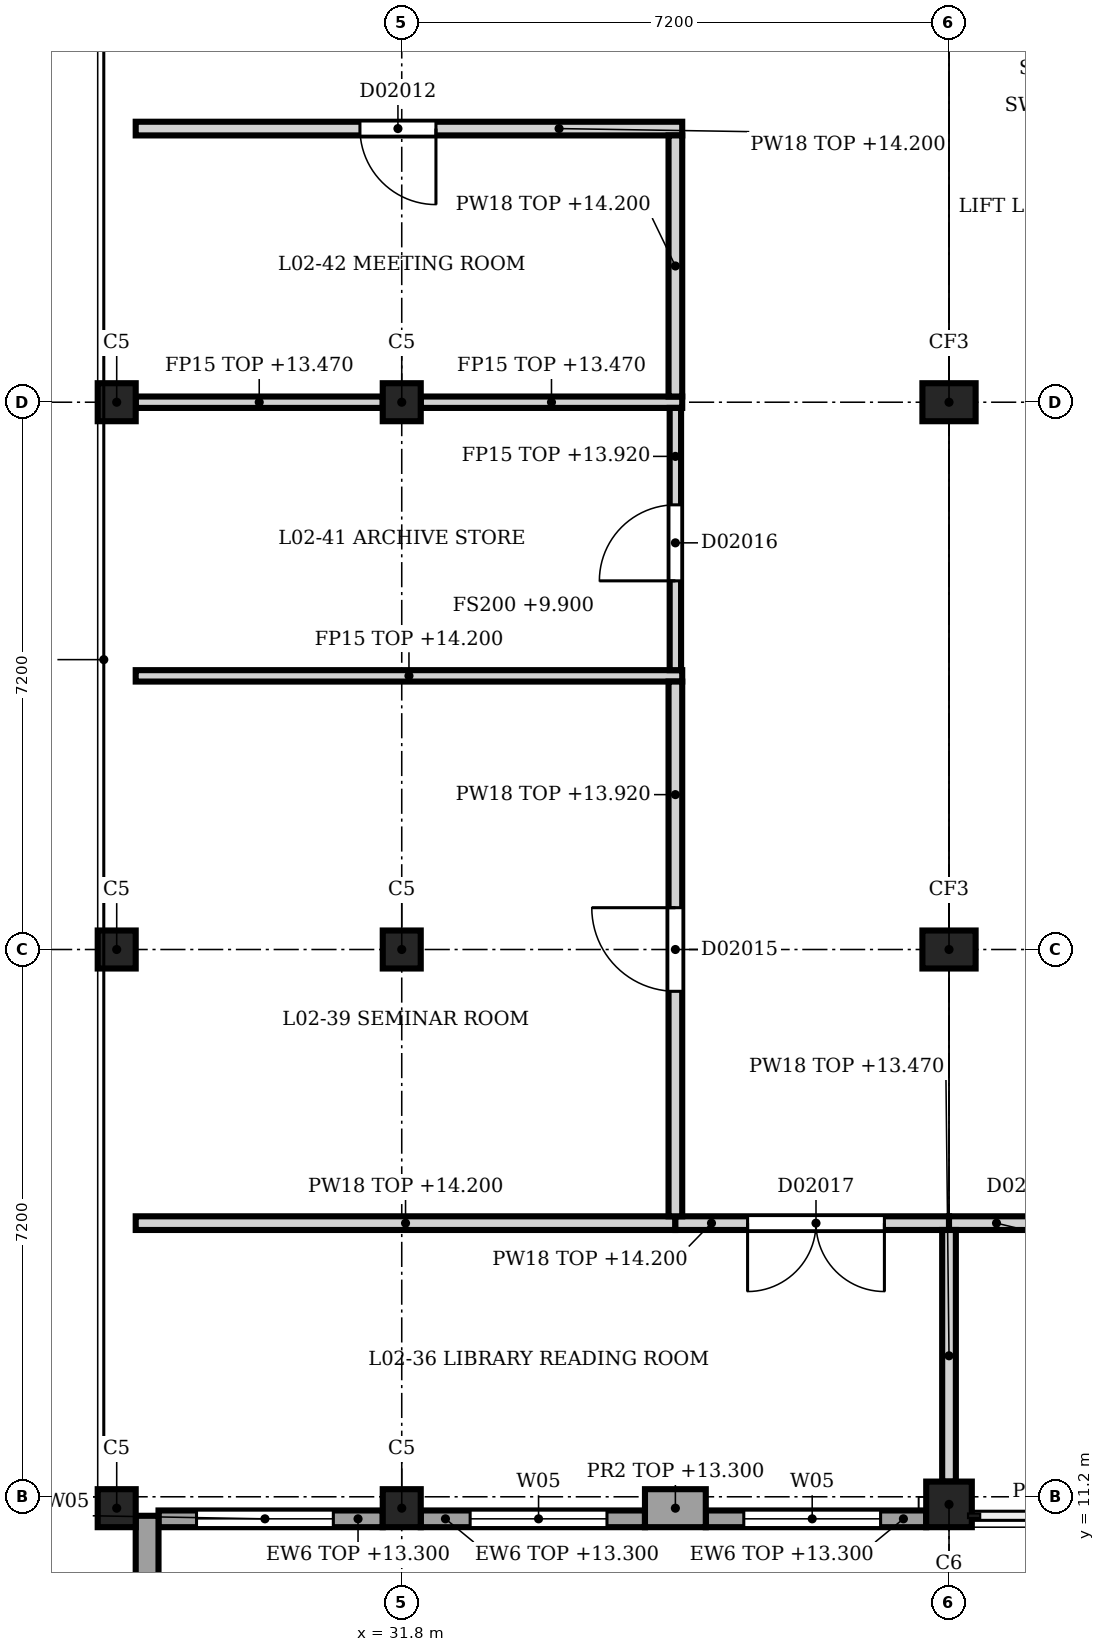
"""IFC4 building model, lengths in metres.
Left out: names, types, materials, properties, quantities, classifications, styles, units other than length and angle.
Written with IfcOpenShell. Run it as: python <this file> out.ifc"""

import sys

from ifc_helpers import new_model, si_unit, direction, frame, frame_2d, origin, origin_2d, place, context, subcontext, project, spatial, rectangle, extrude, element, fill, save


model = new_model("IFC4")
c1 = context("Model", 3, precision=1e-05, world=origin(), true_north=direction((0.0, 1.0)))
c2 = subcontext(c1, "Body", "Model", "MODEL_VIEW")
j1 = project(units=[si_unit("LENGTHUNIT", "METRE"), si_unit("PLANEANGLEUNIT", "RADIAN")], contexts=[c1])
p1 = place(None, origin())
s1 = spatial("IfcSite", under=j1, at=p1, CompositionType="ELEMENT")
p2 = place(p1, origin())
s2 = spatial("IfcBuilding", under=s1, at=p2, CompositionType="ELEMENT")
p3 = place(p2, frame((0.0, 0.0, 9.9)))
s3 = spatial("IfcBuildingStorey", under=s2, at=p3, CompositionType="ELEMENT", Elevation=9.9)
p4 = place(p3, frame((39.0, 11.1, 0.0), z_axis=(0.0, 0.0, 1.0), x_axis=(1.0, 0.0, 0.0)))
e1 = element("IfcColumn", 1, at=p4, inside=s3, PredefinedType="COLUMN", context=c2, shape_type="SweptSolid", body=[
    extrude(rectangle(XDim=0.6, YDim=0.6, at=origin_2d()), origin(), (0.0, 0.0, 1.0), 4.5),
])
for number, where, z_axis, x_axis in (
    (2, (39.0, 18.4, 0.0), (0.0, 0.0, 1.0), (1.0, 0.0, 0.0)),
    (3, (39.0, 25.6, 0.0), (0.0, 0.0, 1.0), (1.0, 0.0, 0.0)),
):
    element("IfcColumn", number, at=place(p3, frame(where, z_axis=z_axis, x_axis=x_axis)), inside=s3, PredefinedType="COLUMN", context=c2, shape_type="SweptSolid", body=[
        extrude(rectangle(XDim=0.7, YDim=0.5, at=origin_2d()), origin(), (0.0, 0.0, 1.0), 4.5),
    ])
for number, where, z_axis, x_axis in (
    (4, (28.05, 11.05, 0.0), (0.0, 0.0, 1.0), (1.0, 0.0, 0.0)),
    (5, (28.05, 18.4, 0.0), (0.0, 0.0, 1.0), (1.0, 0.0, 0.0)),
    (6, (28.05, 25.6, 0.0), (0.0, 0.0, 1.0), (1.0, 0.0, 0.0)),
    (7, (31.8, 11.05, 0.0), (0.0, 0.0, 1.0), (1.0, 0.0, 0.0)),
    (8, (31.8, 18.4, 0.0), (0.0, 0.0, 1.0), (1.0, 0.0, 0.0)),
    (9, (31.8, 25.6, 0.0), (0.0, 0.0, 1.0), (1.0, 0.0, 0.0)),
):
    element("IfcColumn", number, at=place(p3, frame(where, z_axis=z_axis, x_axis=x_axis)), inside=s3, PredefinedType="COLUMN", context=c2, shape_type="SweptSolid", body=[
        extrude(rectangle(XDim=0.5, YDim=0.5, at=origin_2d()), origin(), (0.0, 0.0, 1.0), 4.5),
    ])
p5 = place(p3, frame((28.45, 10.95, 0.0), z_axis=(0.0, 0.0, 1.0), x_axis=(0.0, -1.0, 0.0)))
e10 = element("IfcWall", 10, at=p5, inside=s3, PredefinedType="SOLIDWALL", context=c2, shape_type="SweptSolid", body=[
    extrude(rectangle(XDim=6.95, YDim=0.3, at=frame_2d((3.475, 0.0))), origin(), (0.0, 0.0, 1.0), 4.5),
])
p6 = place(p3, frame((35.8, 11.05, 0.0), z_axis=(0.0, 0.0, 1.0), x_axis=(-1.0, 0.0, 0.0)))
e11 = element("IfcWall", 11, at=p6, inside=s3, PredefinedType="SOLIDWALL", context=c2, shape_type="SweptSolid", body=[
    extrude(rectangle(XDim=0.8, YDim=0.5, at=frame_2d((0.4, 0.0))), origin(), (0.0, 0.0, 1.0), 3.4),
])
p7 = place(p3, frame((38.7, 10.91, 0.0), z_axis=(0.0, 0.0, 1.0), x_axis=(-1.0, 0.0, 0.0)))
e12 = element("IfcWall", 12, at=p7, inside=s3, PredefinedType="SOLIDWALL", context=c2, shape_type="SweptSolid", body=[
    extrude(rectangle(XDim=2.9, YDim=0.22, at=frame_2d((1.45, 0.0))), origin(), (0.0, 0.0, 1.0), 3.4),
])
p8 = place(p7, frame((0.6, 0.0, 0.9)))
e13 = element("IfcOpeningElement", 13, at=p8, cuts=e12, PredefinedType="OPENING", context=c2, shape_type="SweptSolid", body=[
    extrude(rectangle(XDim=1.8, YDim=2.4, at=frame_2d((0.9, 1.2))), frame((0.0, 0.12, 0.0), z_axis=(0.0, -1.0, 0.0), x_axis=(1.0, 0.0, 0.0)), (0.0, 0.0, 1.0), 0.24),
])
p9 = place(p3, frame((35.0, 10.91, 0.0), z_axis=(0.0, 0.0, 1.0), x_axis=(-1.0, 0.0, 0.0)))
e14 = element("IfcWall", 14, at=p9, inside=s3, PredefinedType="SOLIDWALL", context=c2, shape_type="SweptSolid", body=[
    extrude(rectangle(XDim=2.95, YDim=0.22, at=frame_2d((1.475, 0.0))), origin(), (0.0, 0.0, 1.0), 3.4),
])
p10 = place(p9, frame((0.5, 0.0, 0.9)))
e15 = element("IfcOpeningElement", 15, at=p10, cuts=e14, PredefinedType="OPENING", context=c2, shape_type="SweptSolid", body=[
    extrude(rectangle(XDim=1.8, YDim=2.4, at=frame_2d((0.9, 1.2))), frame((0.0, 0.12, 0.0), z_axis=(0.0, -1.0, 0.0), x_axis=(1.0, 0.0, 0.0)), (0.0, 0.0, 1.0), 0.24),
])
p11 = place(p3, frame((31.55, 10.91, 0.0), z_axis=(0.0, 0.0, 1.0), x_axis=(-1.0, 0.0, 0.0)))
e16 = element("IfcWall", 16, at=p11, inside=s3, PredefinedType="SOLIDWALL", context=c2, shape_type="SweptSolid", body=[
    extrude(rectangle(XDim=2.95, YDim=0.22, at=frame_2d((1.475, 0.0))), origin(), (0.0, 0.0, 1.0), 3.4),
])
p12 = place(p11, frame((0.65, 0.0, 0.9)))
e17 = element("IfcOpeningElement", 17, at=p12, cuts=e16, PredefinedType="OPENING", context=c2, shape_type="SweptSolid", body=[
    extrude(rectangle(XDim=1.8, YDim=2.4, at=frame_2d((0.9, 1.2))), frame((0.0, 0.12, 0.0), z_axis=(0.0, -1.0, 0.0), x_axis=(1.0, 0.0, 0.0)), (0.0, 0.0, 1.0), 0.24),
])
p13 = place(p2, frame((0.0, 0.0, 5.4)))
s4 = spatial("IfcBuildingStorey", under=s2, at=p13, CompositionType="ELEMENT", Elevation=5.4)
p14 = place(p13, frame((28.2, 14.8, 0.0), z_axis=(0.0, 0.0, 1.0), x_axis=(-1.0, 0.0, 0.0)))
e18 = element("IfcWall", 18, at=p14, inside=s4, PredefinedType="PARTITIONING", context=c2, shape_type="SweptSolid", body=[
    extrude(rectangle(XDim=7.2, YDim=0.18, at=frame_2d((3.6, 0.0))), origin(), (0.0, 0.0, 1.0), 10.2),
])
p15 = place(p14, frame((2.65, 0.0, 0.0)))
e19 = element("IfcOpeningElement", 19, at=p15, cuts=e18, PredefinedType="OPENING", context=c2, shape_type="SweptSolid", body=[
    extrude(rectangle(XDim=2.0, YDim=2.3, at=frame_2d((1.0, 1.15))), frame((0.0, 0.1, 0.0), z_axis=(0.0, -1.0, 0.0), x_axis=(1.0, 0.0, 0.0)), (0.0, 0.0, 1.0), 0.2),
])
p16 = place(p3, frame((28.3, 14.8, 0.0), z_axis=(0.0, 0.0, 1.0), x_axis=(1.0, 0.0, 0.0)))
e20 = element("IfcWall", 20, at=p16, inside=s3, PredefinedType="PARTITIONING", context=c2, shape_type="SweptSolid", body=[
    extrude(rectangle(XDim=7.1, YDim=0.18, at=frame_2d((3.55, 0.0))), origin(), (0.0, 0.0, 1.0), 4.3),
])
p17 = place(p3, frame((35.4, 14.8, 0.0), z_axis=(0.0, 0.0, 1.0), x_axis=(1.0, 0.0, 0.0)))
e21 = element("IfcWall", 21, at=p17, inside=s3, PredefinedType="PARTITIONING", context=c2, shape_type="SweptSolid", body=[
    extrude(rectangle(XDim=3.6, YDim=0.18, at=frame_2d((1.8, 0.0))), origin(), (0.0, 0.0, 1.0), 4.3),
])
p18 = place(p17, frame((0.95, 0.0, 0.0)))
e22 = element("IfcOpeningElement", 22, at=p18, cuts=e21, PredefinedType="OPENING", context=c2, shape_type="SweptSolid", body=[
    extrude(rectangle(XDim=1.8, YDim=2.1, at=frame_2d((0.9, 1.05))), frame((0.0, 0.1, 0.0), z_axis=(0.0, -1.0, 0.0), x_axis=(1.0, 0.0, 0.0)), (0.0, 0.0, 1.0), 0.2),
])
p19 = place(p3, frame((42.0, 14.8, 0.0), z_axis=(0.0, 0.0, 1.0), x_axis=(-1.0, 0.0, 0.0)))
e23 = element("IfcWall", 23, at=p19, inside=s3, PredefinedType="PARTITIONING", context=c2, shape_type="SweptSolid", body=[
    extrude(rectangle(XDim=3.0, YDim=0.18, at=frame_2d((1.5, 0.0))), origin(), (0.0, 0.0, 1.0), 4.3),
])
p20 = place(p19, frame((0.65, 0.0, 0.0)))
e24 = element("IfcOpeningElement", 24, at=p20, cuts=e23, PredefinedType="OPENING", context=c2, shape_type="SweptSolid", body=[
    extrude(rectangle(XDim=1.1, YDim=2.3, at=frame_2d((0.55, 1.15))), frame((0.0, 0.1, 0.0), z_axis=(0.0, -1.0, 0.0), x_axis=(1.0, 0.0, 0.0)), (0.0, 0.0, 1.0), 0.2),
])
p21 = place(p3, frame((28.3, 22.0, 0.0), z_axis=(0.0, 0.0, 1.0), x_axis=(1.0, 0.0, 0.0)))
e25 = element("IfcWall", 25, at=p21, inside=s3, PredefinedType="PARTITIONING", context=c2, shape_type="SweptSolid", body=[
    extrude(rectangle(XDim=7.19, YDim=0.15, at=frame_2d((3.595, 0.0))), origin(), (0.0, 0.0, 1.0), 4.3),
])
p22 = place(p3, frame((28.3, 25.6, 0.0), z_axis=(0.0, 0.0, 1.0), x_axis=(1.0, 0.0, 0.0)))
e26 = element("IfcWall", 26, at=p22, inside=s3, PredefinedType="PARTITIONING", context=c2, shape_type="SweptSolid", body=[
    extrude(rectangle(XDim=3.25, YDim=0.15, at=frame_2d((1.625, 0.0))), origin(), (0.0, 0.0, 1.0), 3.57),
])
p23 = place(p3, frame((32.05, 25.6, 0.0), z_axis=(0.0, 0.0, 1.0), x_axis=(1.0, 0.0, 0.0)))
e27 = element("IfcWall", 27, at=p23, inside=s3, PredefinedType="PARTITIONING", context=c2, shape_type="SweptSolid", body=[
    extrude(rectangle(XDim=3.44, YDim=0.15, at=frame_2d((1.72, 0.0))), origin(), (0.0, 0.0, 1.0), 3.57),
])
p24 = place(p3, frame((35.49, 29.2, 0.0), z_axis=(0.0, 0.0, 1.0), x_axis=(-1.0, 0.0, 0.0)))
e28 = element("IfcWall", 28, at=p24, inside=s3, PredefinedType="PARTITIONING", context=c2, shape_type="SweptSolid", body=[
    extrude(rectangle(XDim=7.19, YDim=0.18, at=frame_2d((3.595, 0.0))), origin(), (0.0, 0.0, 1.0), 4.3),
])
p25 = place(p24, frame((3.24, 0.0, 0.0)))
e29 = element("IfcOpeningElement", 29, at=p25, cuts=e28, PredefinedType="OPENING", context=c2, shape_type="SweptSolid", body=[
    extrude(rectangle(XDim=1.0, YDim=2.1, at=frame_2d((0.5, 1.05))), frame((0.0, 0.1, 0.0), z_axis=(0.0, -1.0, 0.0), x_axis=(1.0, 0.0, 0.0)), (0.0, 0.0, 1.0), 0.2),
])
p26 = place(p3, frame((35.4, 14.89, 0.0), z_axis=(0.0, 0.0, 1.0), x_axis=(0.0, 1.0, 0.0)))
e30 = element("IfcWall", 30, at=p26, inside=s3, PredefinedType="PARTITIONING", context=c2, shape_type="SweptSolid", body=[
    extrude(rectangle(XDim=7.035, YDim=0.18, at=frame_2d((3.518, 0.0))), origin(), (0.0, 0.0, 1.0), 4.02),
])
p27 = place(p26, frame((2.96, 0.0, 0.0)))
e31 = element("IfcOpeningElement", 31, at=p27, cuts=e30, PredefinedType="OPENING", context=c2, shape_type="SweptSolid", body=[
    extrude(rectangle(XDim=1.1, YDim=2.3, at=frame_2d((0.55, 1.15))), frame((0.0, 0.1, 0.0), z_axis=(0.0, -1.0, 0.0), x_axis=(1.0, 0.0, 0.0)), (0.0, 0.0, 1.0), 0.2),
])
p28 = place(p3, frame((35.4, 22.075, 0.0), z_axis=(0.0, 0.0, 1.0), x_axis=(0.0, 1.0, 0.0)))
e32 = element("IfcWall", 32, at=p28, inside=s3, PredefinedType="PARTITIONING", context=c2, shape_type="SweptSolid", body=[
    extrude(rectangle(XDim=3.45, YDim=0.15, at=frame_2d((1.725, 0.0))), origin(), (0.0, 0.0, 1.0), 4.02),
])
p29 = place(p28, frame((1.175, 0.0, 0.0)))
e33 = element("IfcOpeningElement", 33, at=p29, cuts=e32, PredefinedType="OPENING", context=c2, shape_type="SweptSolid", body=[
    extrude(rectangle(XDim=1.0, YDim=2.1, at=frame_2d((0.5, 1.05))), frame((0.0, 0.085, 0.0), z_axis=(0.0, -1.0, 0.0), x_axis=(1.0, 0.0, 0.0)), (0.0, 0.0, 1.0), 0.17),
])
p30 = place(p3, frame((35.4, 25.675, 0.0), z_axis=(0.0, 0.0, 1.0), x_axis=(0.0, 1.0, 0.0)))
e34 = element("IfcWall", 34, at=p30, inside=s3, PredefinedType="PARTITIONING", context=c2, shape_type="SweptSolid", body=[
    extrude(rectangle(XDim=3.435, YDim=0.18, at=frame_2d((1.718, 0.0))), origin(), (0.0, 0.0, 1.0), 4.3),
])
p31 = place(p3, frame((39.0, 11.4, 0.0), z_axis=(0.0, 0.0, 1.0), x_axis=(0.0, 1.0, 0.0)))
e35 = element("IfcWall", 35, at=p31, inside=s3, PredefinedType="PARTITIONING", context=c2, shape_type="SweptSolid", body=[
    extrude(rectangle(XDim=3.31, YDim=0.18, at=frame_2d((1.655, 0.0))), origin(), (0.0, 0.0, 1.0), 3.57),
])
p32 = place(p8, origin())
e36 = element("IfcWindow", 36, at=p32, inside=s3, PartitioningType="SINGLE_PANEL", PredefinedType="WINDOW", context=c2, shape_type="SweptSolid", body=[
    extrude(rectangle(XDim=1.8, YDim=2.4, at=frame_2d((0.9, 1.2))), frame((0.0, 0.03, 0.0), z_axis=(0.0, -1.0, 0.0), x_axis=(1.0, 0.0, 0.0)), (0.0, 0.0, 1.0), 0.06),
])
fill(e13, e36)
p33 = place(p10, origin())
e37 = element("IfcWindow", 37, at=p33, inside=s3, PartitioningType="SINGLE_PANEL", PredefinedType="WINDOW", context=c2, shape_type="SweptSolid", body=[
    extrude(rectangle(XDim=1.8, YDim=2.4, at=frame_2d((0.9, 1.2))), frame((0.0, 0.03, 0.0), z_axis=(0.0, -1.0, 0.0), x_axis=(1.0, 0.0, 0.0)), (0.0, 0.0, 1.0), 0.06),
])
fill(e15, e37)
p34 = place(p12, origin())
e38 = element("IfcWindow", 38, at=p34, inside=s3, PartitioningType="SINGLE_PANEL", PredefinedType="WINDOW", context=c2, shape_type="SweptSolid", body=[
    extrude(rectangle(XDim=1.8, YDim=2.4, at=frame_2d((0.9, 1.2))), frame((0.0, 0.03, 0.0), z_axis=(0.0, -1.0, 0.0), x_axis=(1.0, 0.0, 0.0)), (0.0, 0.0, 1.0), 0.06),
])
fill(e17, e38)
p35 = place(p18, origin())
e39 = element("IfcDoor", 39, at=p35, inside=s3, OperationType="SINGLE_SWING_LEFT", PredefinedType="DOOR", context=c2, shape_type="SweptSolid", body=[
    extrude(rectangle(XDim=1.8, YDim=2.1, at=frame_2d((0.9, 1.05))), frame((0.0, 0.025, 0.0), z_axis=(0.0, -1.0, 0.0), x_axis=(1.0, 0.0, 0.0)), (0.0, 0.0, 1.0), 0.05),
])
fill(e22, e39)
p36 = place(p25, origin())
e40 = element("IfcDoor", 40, at=p36, inside=s3, OperationType="SINGLE_SWING_RIGHT", PredefinedType="DOOR", context=c2, shape_type="SweptSolid", body=[
    extrude(rectangle(XDim=1.0, YDim=2.1, at=frame_2d((0.5, 1.05))), frame((0.0, 0.025, 0.0), z_axis=(0.0, -1.0, 0.0), x_axis=(1.0, 0.0, 0.0)), (0.0, 0.0, 1.0), 0.05),
])
fill(e29, e40)
p37 = place(p27, origin())
e41 = element("IfcDoor", 41, at=p37, inside=s3, OperationType="SINGLE_SWING_LEFT", PredefinedType="DOOR", context=c2, shape_type="SweptSolid", body=[
    extrude(rectangle(XDim=1.1, YDim=2.3, at=frame_2d((0.55, 1.15))), frame((0.0, 0.025, 0.0), z_axis=(0.0, -1.0, 0.0), x_axis=(1.0, 0.0, 0.0)), (0.0, 0.0, 1.0), 0.05),
])
fill(e31, e41)
p38 = place(p29, origin())
e42 = element("IfcDoor", 42, at=p38, inside=s3, OperationType="SINGLE_SWING_LEFT", PredefinedType="DOOR", context=c2, shape_type="SweptSolid", body=[
    extrude(rectangle(XDim=1.0, YDim=2.1, at=frame_2d((0.5, 1.05))), frame((0.0, 0.025, 0.0), z_axis=(0.0, -1.0, 0.0), x_axis=(1.0, 0.0, 0.0)), (0.0, 0.0, 1.0), 0.05),
])
fill(e33, e42)
save(model, sys.argv[1])
